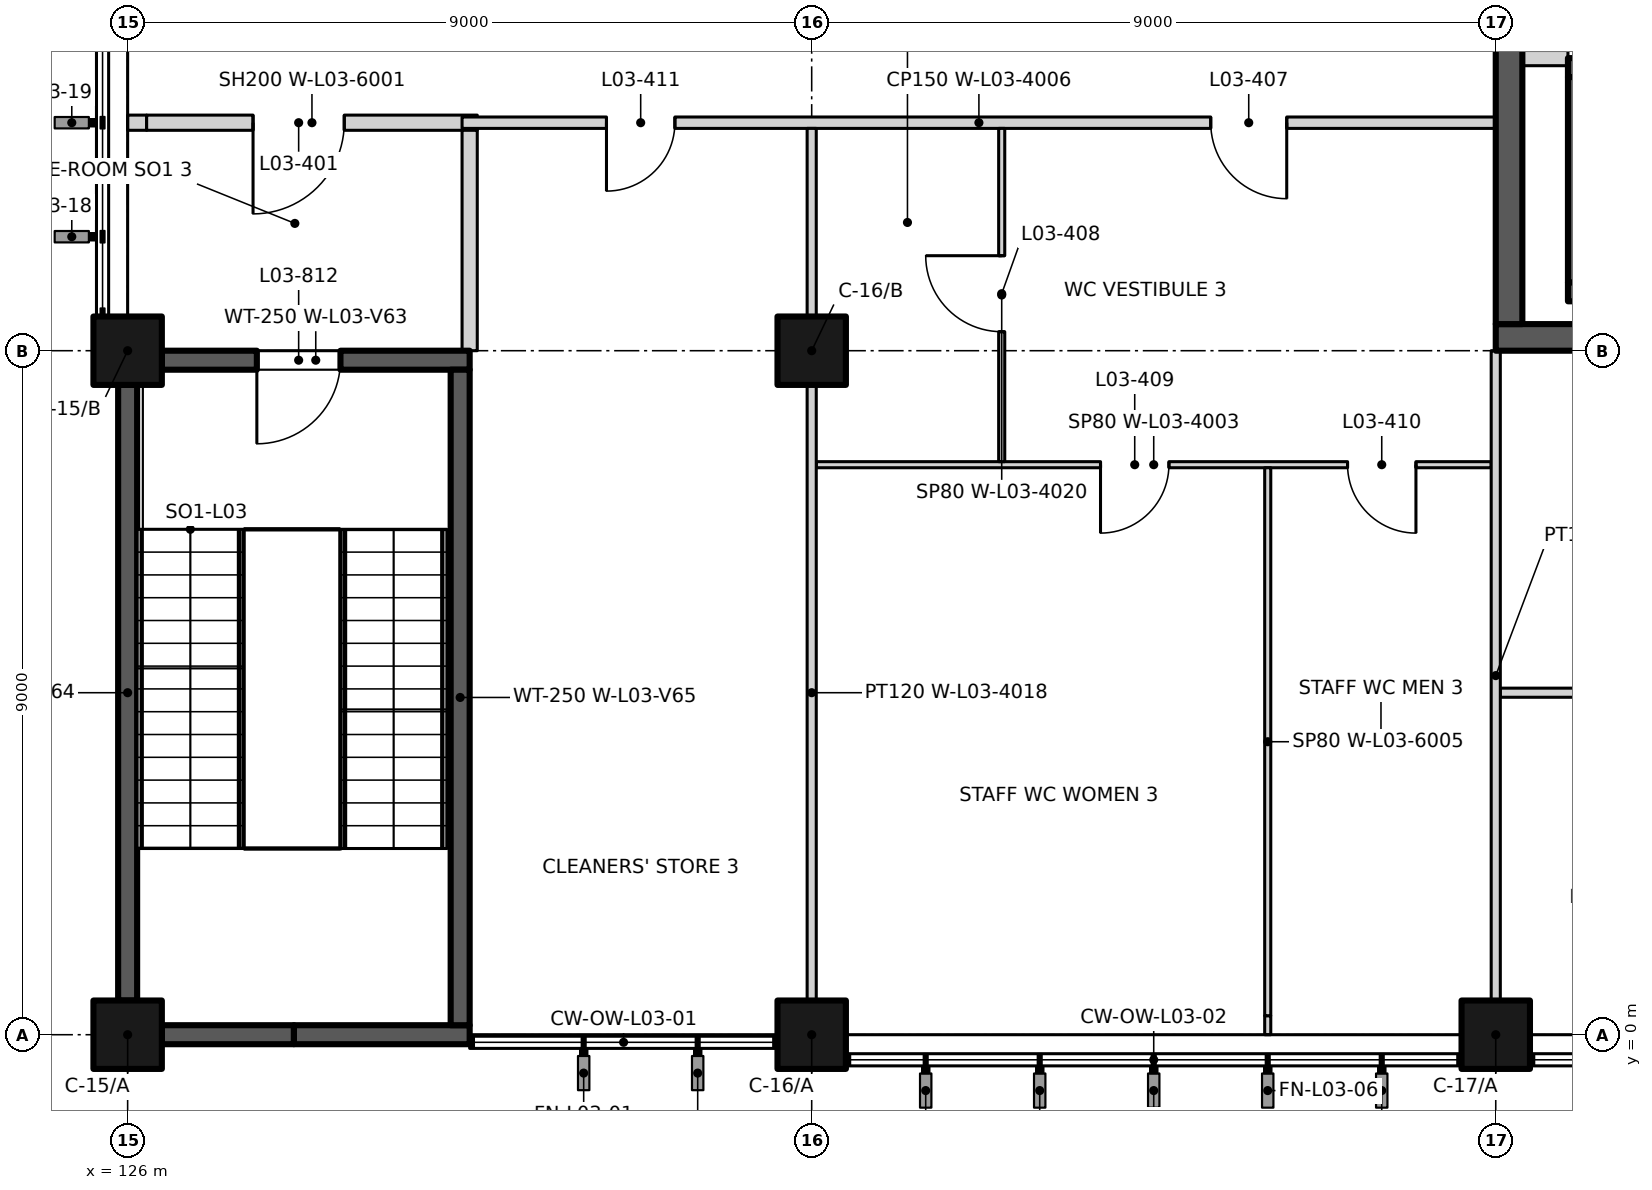
"""IFC4 building model, lengths in metres.
Left out: names, types, materials, properties, quantities, classifications, styles, units other than length and angle.
Written with IfcOpenShell. Run it as: python <this file> out.ifc"""

import sys

from ifc_helpers import new_model, si_unit, direction, frame, frame_2d, origin, origin_2d, place, context, subcontext, project, spatial, rectangle, extrude, element, fill, save


model = new_model("IFC4")
c1 = context("Model", 3, precision=1e-05, world=origin(), true_north=direction((0.0, 1.0)))
c2 = subcontext(c1, "Body", "Model", "MODEL_VIEW")
j1 = project(units=[si_unit("LENGTHUNIT", "METRE"), si_unit("PLANEANGLEUNIT", "RADIAN")], contexts=[c1])
p1 = place(None, origin())
s1 = spatial("IfcSite", under=j1, at=p1, CompositionType="ELEMENT")
p2 = place(p1, origin())
s2 = spatial("IfcBuilding", under=s1, at=p2, CompositionType="ELEMENT")
p3 = place(p2, frame((0.0, 0.0, 15.0)))
s3 = spatial("IfcBuildingStorey", under=s2, at=p3, CompositionType="ELEMENT", Elevation=15.0)
for number, where, z_axis, x_axis in (
    (1, (126.0, 0.0, 0.0), (0.0, 0.0, 1.0), (1.0, 0.0, 0.0)),
    (2, (135.0, 0.0, 0.0), (0.0, 0.0, 1.0), (1.0, 0.0, 0.0)),
    (3, (144.0, 0.0, 0.0), (0.0, 0.0, 1.0), (1.0, 0.0, 0.0)),
    (4, (126.0, 9.0, 0.0), (0.0, 0.0, 1.0), (1.0, 0.0, 0.0)),
    (5, (135.0, 9.0, 0.0), (0.0, 0.0, 1.0), (1.0, 0.0, 0.0)),
):
    element("IfcColumn", number, at=place(p3, frame(where, z_axis=z_axis, x_axis=x_axis)), inside=s3, PredefinedType="COLUMN", context=c2, shape_type="SweptSolid", body=[
        extrude(rectangle(XDim=0.9, YDim=0.9, at=origin_2d()), origin(), (0.0, 0.0, 1.0), 4.5),
    ])
p4 = place(p3, frame((126.45, 0.0, 0.0), z_axis=(0.0, 0.0, 1.0), x_axis=(1.0, 0.0, 0.0)))
e6 = element("IfcWall", 6, at=p4, inside=s3, PredefinedType="SHEAR", context=c2, shape_type="SweptSolid", body=[
    extrude(rectangle(XDim=1.738, YDim=0.25, at=frame_2d((0.869, 0.0))), origin(), (0.0, 0.0, 1.0), 4.5),
])
p5 = place(p3, frame((128.188, 0.0, 0.0), z_axis=(0.0, 0.0, 1.0), x_axis=(1.0, 0.0, 0.0)))
e7 = element("IfcWall", 7, at=p5, inside=s3, PredefinedType="SHEAR", context=c2, shape_type="SweptSolid", body=[
    extrude(rectangle(XDim=2.312, YDim=0.25, at=frame_2d((1.156, 0.0))), origin(), (0.0, 0.0, 1.0), 4.5),
])
p6 = place(p3, frame((126.45, 8.875, 0.0), z_axis=(0.0, 0.0, 1.0), x_axis=(1.0, 0.0, 0.0)))
e8 = element("IfcWall", 8, at=p6, inside=s3, PredefinedType="SHEAR", context=c2, shape_type="SweptSolid", body=[
    extrude(rectangle(XDim=4.05, YDim=0.25, at=frame_2d((2.025, 0.0))), origin(), (0.0, 0.0, 1.0), 4.5),
])
p7 = place(p6, frame((2.35, 0.0, 0.0), z_axis=(0.0, 0.0, 1.0), x_axis=(-1.0, 0.0, 0.0)))
e9 = element("IfcOpeningElement", 9, at=p7, cuts=e8, PredefinedType="OPENING", context=c2, shape_type="SweptSolid", body=[
    extrude(rectangle(XDim=1.1, YDim=2.1, at=frame_2d((0.55, 1.05))), frame((0.0, 0.135, 0.0), z_axis=(0.0, -1.0, 0.0), x_axis=(1.0, 0.0, 0.0)), (0.0, 0.0, 1.0), 0.27),
])
p8 = place(p3, frame((126.0, 0.45, 0.0), z_axis=(0.0, 0.0, 1.0), x_axis=(0.0, 1.0, 0.0)))
e10 = element("IfcWall", 10, at=p8, inside=s3, PredefinedType="SHEAR", context=c2, shape_type="SweptSolid", body=[
    extrude(rectangle(XDim=8.1, YDim=0.25, at=frame_2d((4.05, 0.0))), origin(), (0.0, 0.0, 1.0), 4.5),
])
p9 = place(p3, frame((130.375, 0.125, 0.0), z_axis=(0.0, 0.0, 1.0), x_axis=(0.0, 1.0, 0.0)))
e11 = element("IfcWall", 11, at=p9, inside=s3, PredefinedType="SHEAR", context=c2, shape_type="SweptSolid", body=[
    extrude(rectangle(XDim=8.625, YDim=0.25, at=frame_2d((4.312, 0.0))), origin(), (0.0, 0.0, 1.0), 4.5),
])
p10 = place(p3, frame((144.95, 12.725, 0.0), z_axis=(0.0, 0.0, 1.0), x_axis=(1.0, 0.0, 0.0)))
e12 = element("IfcWall", 12, at=p10, inside=s3, PredefinedType="SHEAR", context=c2, shape_type="SweptSolid", body=[
    extrude(rectangle(XDim=12.05, YDim=0.25, at=frame_2d((6.025, 0.0))), origin(), (0.0, 0.0, 1.0), 4.5),
])
p11 = place(p10, frame((1.05, 0.0, 0.0)))
e13 = element("IfcOpeningElement", 13, at=p11, cuts=e12, PredefinedType="OPENING", context=c2, shape_type="SweptSolid", body=[
    extrude(rectangle(XDim=1.1, YDim=2.1, at=frame_2d((0.55, 1.05))), frame((0.0, 0.135, 0.0), z_axis=(0.0, -1.0, 0.0), x_axis=(1.0, 0.0, 0.0)), (0.0, 0.0, 1.0), 0.27),
])
p12 = place(p10, frame((4.0, 0.0, 0.0)))
e14 = element("IfcOpeningElement", 14, at=p12, cuts=e12, PredefinedType="OPENING", context=c2, shape_type="SweptSolid", body=[
    extrude(rectangle(XDim=1.1, YDim=2.1, at=frame_2d((0.55, 1.05))), frame((0.0, 0.135, 0.0), z_axis=(0.0, -1.0, 0.0), x_axis=(1.0, 0.0, 0.0)), (0.0, 0.0, 1.0), 0.27),
])
p13 = place(p10, frame((6.95, 0.0, 0.0)))
e15 = element("IfcOpeningElement", 15, at=p13, cuts=e12, PredefinedType="OPENING", context=c2, shape_type="SweptSolid", body=[
    extrude(rectangle(XDim=1.1, YDim=2.1, at=frame_2d((0.55, 1.05))), frame((0.0, 0.135, 0.0), z_axis=(0.0, -1.0, 0.0), x_axis=(1.0, 0.0, 0.0)), (0.0, 0.0, 1.0), 0.27),
])
p14 = place(p10, frame((9.9, 0.0, 0.0)))
e16 = element("IfcOpeningElement", 16, at=p14, cuts=e12, PredefinedType="OPENING", context=c2, shape_type="SweptSolid", body=[
    extrude(rectangle(XDim=1.1, YDim=2.1, at=frame_2d((0.55, 1.05))), frame((0.0, 0.135, 0.0), z_axis=(0.0, -1.0, 0.0), x_axis=(1.0, 0.0, 0.0)), (0.0, 0.0, 1.0), 0.27),
])
p15 = place(p3, frame((144.95, 9.775, 0.0), z_axis=(0.0, 0.0, 1.0), x_axis=(1.0, 0.0, 0.0)))
e17 = element("IfcWall", 17, at=p15, inside=s3, PredefinedType="SHEAR", context=c2, shape_type="SweptSolid", body=[
    extrude(rectangle(XDim=12.05, YDim=0.25, at=frame_2d((6.025, 0.0))), origin(), (0.0, 0.0, 1.0), 4.5),
])
p16 = place(p3, frame((145.075, 9.9, 0.0), z_axis=(0.0, 0.0, 1.0), x_axis=(0.0, 1.0, 0.0)))
e18 = element("IfcWall", 18, at=p16, inside=s3, PredefinedType="SHEAR", context=c2, shape_type="SweptSolid", body=[
    extrude(rectangle(XDim=2.7, YDim=0.25, at=frame_2d((1.35, 0.0))), origin(), (0.0, 0.0, 1.0), 4.5),
])
p17 = place(p3, frame((144.06, 4.5, 0.0), z_axis=(0.0, 0.0, 1.0), x_axis=(1.0, 0.0, 0.0)))
e19 = element("IfcWall", 19, at=p17, inside=s3, PredefinedType="PARTITIONING", context=c2, shape_type="SweptSolid", body=[
    extrude(rectangle(XDim=6.0, YDim=0.12, at=frame_2d((3.0, 0.0))), origin(), (0.0, 0.0, 1.0), 4.2),
])
p18 = place(p17, frame((3.39, 0.0, 0.0), z_axis=(0.0, 0.0, 1.0), x_axis=(-1.0, 0.0, 0.0)))
e20 = element("IfcOpeningElement", 20, at=p18, cuts=e19, PredefinedType="OPENING", context=c2, shape_type="SweptSolid", body=[
    extrude(rectangle(XDim=0.9, YDim=2.1, at=frame_2d((0.45, 1.05))), frame((0.0, 0.07, 0.0), z_axis=(0.0, -1.0, 0.0), x_axis=(1.0, 0.0, 0.0)), (0.0, 0.0, 1.0), 0.14),
])
p19 = place(p3, frame((135.06, 7.5, 0.0), z_axis=(0.0, 0.0, 1.0), x_axis=(1.0, 0.0, 0.0)))
e21 = element("IfcWall", 21, at=p19, inside=s3, PredefinedType="PARTITIONING", context=c2, shape_type="SweptSolid", body=[
    extrude(rectangle(XDim=8.88, YDim=0.08, at=frame_2d((4.44, 0.0))), origin(), (0.0, 0.0, 1.0), 4.2),
])
p20 = place(p19, frame((4.64, 0.0, 0.0), z_axis=(0.0, 0.0, 1.0), x_axis=(-1.0, 0.0, 0.0)))
e22 = element("IfcOpeningElement", 22, at=p20, cuts=e21, PredefinedType="OPENING", context=c2, shape_type="SweptSolid", body=[
    extrude(rectangle(XDim=0.9, YDim=2.1, at=frame_2d((0.45, 1.05))), frame((0.0, 0.05, 0.0), z_axis=(0.0, -1.0, 0.0), x_axis=(1.0, 0.0, 0.0)), (0.0, 0.0, 1.0), 0.1),
])
p21 = place(p19, frame((7.89, 0.0, 0.0), z_axis=(0.0, 0.0, 1.0), x_axis=(-1.0, 0.0, 0.0)))
e23 = element("IfcOpeningElement", 23, at=p21, cuts=e21, PredefinedType="OPENING", context=c2, shape_type="SweptSolid", body=[
    extrude(rectangle(XDim=0.9, YDim=2.1, at=frame_2d((0.45, 1.05))), frame((0.0, 0.05, 0.0), z_axis=(0.0, -1.0, 0.0), x_axis=(1.0, 0.0, 0.0)), (0.0, 0.0, 1.0), 0.1),
])
p22 = place(p3, frame((144.0, 9.175, 0.0), z_axis=(0.0, 0.0, 1.0), x_axis=(1.0, 0.0, 0.0)))
e24 = element("IfcWall", 24, at=p22, inside=s3, PredefinedType="SHEAR", context=c2, shape_type="SweptSolid", body=[
    extrude(rectangle(XDim=18.0, YDim=0.35, at=frame_2d((9.0, 0.0))), origin(), (0.0, 0.0, 1.0), 4.2),
])
p23 = place(p22, frame((16.463, 0.0, 0.0), z_axis=(0.0, 0.0, 1.0), x_axis=(-1.0, 0.0, 0.0)))
e25 = element("IfcOpeningElement", 25, at=p23, cuts=e24, PredefinedType="OPENING", context=c2, shape_type="SweptSolid", body=[
    extrude(rectangle(XDim=2.1, YDim=2.4, at=frame_2d((1.05, 1.2))), frame((0.0, 0.185, 0.0), z_axis=(0.0, -1.0, 0.0), x_axis=(1.0, 0.0, 0.0)), (0.0, 0.0, 1.0), 0.37),
])
p24 = place(p3, frame((126.0, 12.0, 0.0), z_axis=(0.0, 0.0, 1.0), x_axis=(1.0, 0.0, 0.0)))
e26 = element("IfcWall", 26, at=p24, inside=s3, PredefinedType="PARTITIONING", context=c2, shape_type="SweptSolid", body=[
    extrude(rectangle(XDim=0.25, YDim=0.2, at=frame_2d((0.125, 0.0))), origin(), (0.0, 0.0, 1.0), 3.6),
])
p25 = place(p3, frame((126.25, 12.0, 0.0), z_axis=(0.0, 0.0, 1.0), x_axis=(1.0, 0.0, 0.0)))
e27 = element("IfcWall", 27, at=p25, inside=s3, PredefinedType="PARTITIONING", context=c2, shape_type="SweptSolid", body=[
    extrude(rectangle(XDim=4.35, YDim=0.2, at=frame_2d((2.175, 0.0))), origin(), (0.0, 0.0, 1.0), 4.2),
])
p26 = place(p25, frame((2.6, 0.0, 0.0), z_axis=(0.0, 0.0, 1.0), x_axis=(-1.0, 0.0, 0.0)))
e28 = element("IfcOpeningElement", 28, at=p26, cuts=e27, PredefinedType="OPENING", context=c2, shape_type="SweptSolid", body=[
    extrude(rectangle(XDim=1.2, YDim=2.1, at=frame_2d((0.6, 1.05))), frame((0.0, 0.11, 0.0), z_axis=(0.0, -1.0, 0.0), x_axis=(1.0, 0.0, 0.0)), (0.0, 0.0, 1.0), 0.22),
])
p27 = place(p3, frame((130.4, 12.0, 0.0), z_axis=(0.0, 0.0, 1.0), x_axis=(1.0, 0.0, 0.0)))
e29 = element("IfcWall", 29, at=p27, inside=s3, PredefinedType="PARTITIONING", context=c2, shape_type="SweptSolid", body=[
    extrude(rectangle(XDim=13.6, YDim=0.15, at=frame_2d((6.8, 0.0))), origin(), (0.0, 0.0, 1.0), 4.2),
])
p28 = place(p27, frame((10.85, 0.0, 0.0), z_axis=(0.0, 0.0, 1.0), x_axis=(-1.0, 0.0, 0.0)))
e30 = element("IfcOpeningElement", 30, at=p28, cuts=e29, PredefinedType="OPENING", context=c2, shape_type="SweptSolid", body=[
    extrude(rectangle(XDim=1.0, YDim=2.1, at=frame_2d((0.5, 1.05))), frame((0.0, 0.085, 0.0), z_axis=(0.0, -1.0, 0.0), x_axis=(1.0, 0.0, 0.0)), (0.0, 0.0, 1.0), 0.17),
])
p29 = place(p27, frame((2.8, 0.0, 0.0), z_axis=(0.0, 0.0, 1.0), x_axis=(-1.0, 0.0, 0.0)))
e31 = element("IfcOpeningElement", 31, at=p29, cuts=e29, PredefinedType="OPENING", context=c2, shape_type="SweptSolid", body=[
    extrude(rectangle(XDim=0.9, YDim=2.1, at=frame_2d((0.45, 1.05))), frame((0.0, 0.085, 0.0), z_axis=(0.0, -1.0, 0.0), x_axis=(1.0, 0.0, 0.0)), (0.0, 0.0, 1.0), 0.17),
])
p30 = place(p3, frame((144.35, 12.85, 0.0), z_axis=(0.0, 0.0, 1.0), x_axis=(1.0, 0.0, 0.0)))
e32 = element("IfcWall", 32, at=p30, inside=s3, PredefinedType="PARTITIONING", context=c2, shape_type="SweptSolid", body=[
    extrude(rectangle(XDim=0.6, YDim=0.2, at=frame_2d((0.3, 0.0))), origin(), (0.0, 0.0, 1.0), 4.2),
])
p31 = place(p3, frame((130.5, 9.0, 0.0), z_axis=(0.0, 0.0, 1.0), x_axis=(0.0, 1.0, 0.0)))
e33 = element("IfcWall", 33, at=p31, inside=s3, PredefinedType="PARTITIONING", context=c2, shape_type="SweptSolid", body=[
    extrude(rectangle(XDim=2.9, YDim=0.2, at=frame_2d((1.45, 0.0))), origin(), (0.0, 0.0, 1.0), 4.2),
])
p32 = place(p3, frame((135.0, 0.45, 0.0), z_axis=(0.0, 0.0, 1.0), x_axis=(0.0, 1.0, 0.0)))
e34 = element("IfcWall", 34, at=p32, inside=s3, PredefinedType="PARTITIONING", context=c2, shape_type="SweptSolid", body=[
    extrude(rectangle(XDim=8.1, YDim=0.12, at=frame_2d((4.05, 0.0))), origin(), (0.0, 0.0, 1.0), 4.2),
])
p33 = place(p3, frame((135.0, 9.45, 0.0), z_axis=(0.0, 0.0, 1.0), x_axis=(0.0, 1.0, 0.0)))
e35 = element("IfcWall", 35, at=p33, inside=s3, PredefinedType="PARTITIONING", context=c2, shape_type="SweptSolid", body=[
    extrude(rectangle(XDim=2.475, YDim=0.12, at=frame_2d((1.238, 0.0))), origin(), (0.0, 0.0, 1.0), 4.2),
])
p34 = place(p3, frame((137.5, 7.54, 0.0), z_axis=(0.0, 0.0, 1.0), x_axis=(0.0, 1.0, 0.0)))
e36 = element("IfcWall", 36, at=p34, inside=s3, PredefinedType="PARTITIONING", context=c2, shape_type="SweptSolid", body=[
    extrude(rectangle(XDim=4.385, YDim=0.08, at=frame_2d((2.192, 0.0))), origin(), (0.0, 0.0, 1.0), 4.2),
])
p35 = place(p34, frame((1.71, 0.0, 0.0)))
e37 = element("IfcOpeningElement", 37, at=p35, cuts=e36, PredefinedType="OPENING", context=c2, shape_type="SweptSolid", body=[
    extrude(rectangle(XDim=1.0, YDim=2.1, at=frame_2d((0.5, 1.05))), frame((0.0, 0.05, 0.0), z_axis=(0.0, -1.0, 0.0), x_axis=(1.0, 0.0, 0.0)), (0.0, 0.0, 1.0), 0.1),
])
p36 = place(p3, frame((141.0, 0.0, 0.0), z_axis=(0.0, 0.0, 1.0), x_axis=(0.0, 1.0, 0.0)))
e38 = element("IfcWall", 38, at=p36, inside=s3, PredefinedType="PARTITIONING", context=c2, shape_type="SweptSolid", body=[
    extrude(rectangle(XDim=0.25, YDim=0.08, at=frame_2d((0.125, 0.0))), origin(), (0.0, 0.0, 1.0), 3.6),
])
p37 = place(p3, frame((141.0, 0.25, 0.0), z_axis=(0.0, 0.0, 1.0), x_axis=(0.0, 1.0, 0.0)))
e39 = element("IfcWall", 39, at=p37, inside=s3, PredefinedType="PARTITIONING", context=c2, shape_type="SweptSolid", body=[
    extrude(rectangle(XDim=7.21, YDim=0.08, at=frame_2d((3.605, 0.0))), origin(), (0.0, 0.0, 1.0), 4.2),
])
p38 = place(p3, frame((144.0, 0.45, 0.0), z_axis=(0.0, 0.0, 1.0), x_axis=(0.0, 1.0, 0.0)))
e40 = element("IfcWall", 40, at=p38, inside=s3, PredefinedType="PARTITIONING", context=c2, shape_type="SweptSolid", body=[
    extrude(rectangle(XDim=8.55, YDim=0.12, at=frame_2d((4.275, 0.0))), origin(), (0.0, 0.0, 1.0), 4.2),
])
p39 = place(p3, frame((144.175, 9.35, 0.0), z_axis=(0.0, 0.0, 1.0), x_axis=(0.0, 1.0, 0.0)))
e41 = element("IfcWall", 41, at=p39, inside=s3, PredefinedType="SHEAR", context=c2, shape_type="SweptSolid", body=[
    extrude(rectangle(XDim=17.4, YDim=0.35, at=frame_2d((8.7, 0.0))), origin(), (0.0, 0.0, 1.0), 4.2),
])
p40 = place(p39, frame((3.75, 0.0, 0.0)))
e42 = element("IfcOpeningElement", 42, at=p40, cuts=e41, PredefinedType="OPENING", context=c2, shape_type="SweptSolid", body=[
    extrude(rectangle(XDim=1.6, YDim=2.4, at=frame_2d((0.8, 1.2))), frame((0.0, 0.185, 0.0), z_axis=(0.0, -1.0, 0.0), x_axis=(1.0, 0.0, 0.0)), (0.0, 0.0, 1.0), 0.37),
])
p41 = place(p7, origin())
e43 = element("IfcDoor", 43, at=p41, inside=s3, OperationType="SINGLE_SWING_RIGHT", PredefinedType="DOOR", context=c2, shape_type="SweptSolid", body=[
    extrude(rectangle(XDim=1.1, YDim=2.1, at=frame_2d((0.55, 1.05))), frame((0.0, 0.025, 0.0), z_axis=(0.0, -1.0, 0.0), x_axis=(1.0, 0.0, 0.0)), (0.0, 0.0, 1.0), 0.05),
])
fill(e9, e43)
p42 = place(p26, origin())
e44 = element("IfcDoor", 44, at=p42, inside=s3, OperationType="SINGLE_SWING_RIGHT", PredefinedType="DOOR", context=c2, shape_type="SweptSolid", body=[
    extrude(rectangle(XDim=1.2, YDim=2.1, at=frame_2d((0.6, 1.05))), frame((0.0, 0.025, 0.0), z_axis=(0.0, -1.0, 0.0), x_axis=(1.0, 0.0, 0.0)), (0.0, 0.0, 1.0), 0.05),
])
fill(e28, e44)
p43 = place(p28, origin())
e45 = element("IfcDoor", 45, at=p43, inside=s3, OperationType="SINGLE_SWING_LEFT", PredefinedType="DOOR", context=c2, shape_type="SweptSolid", body=[
    extrude(rectangle(XDim=1.0, YDim=2.1, at=frame_2d((0.5, 1.05))), frame((0.0, 0.025, 0.0), z_axis=(0.0, -1.0, 0.0), x_axis=(1.0, 0.0, 0.0)), (0.0, 0.0, 1.0), 0.05),
])
fill(e30, e45)
p44 = place(p35, origin())
e46 = element("IfcDoor", 46, at=p44, inside=s3, OperationType="SINGLE_SWING_RIGHT", PredefinedType="DOOR", context=c2, shape_type="SweptSolid", body=[
    extrude(rectangle(XDim=1.0, YDim=2.1, at=frame_2d((0.5, 1.05))), frame((0.0, 0.025, 0.0), z_axis=(0.0, -1.0, 0.0), x_axis=(1.0, 0.0, 0.0)), (0.0, 0.0, 1.0), 0.05),
])
fill(e37, e46)
p45 = place(p20, origin())
e47 = element("IfcDoor", 47, at=p45, inside=s3, OperationType="SINGLE_SWING_RIGHT", PredefinedType="DOOR", context=c2, shape_type="SweptSolid", body=[
    extrude(rectangle(XDim=0.9, YDim=2.1, at=frame_2d((0.45, 1.05))), frame((0.0, 0.025, 0.0), z_axis=(0.0, -1.0, 0.0), x_axis=(1.0, 0.0, 0.0)), (0.0, 0.0, 1.0), 0.05),
])
fill(e22, e47)
p46 = place(p21, origin())
e48 = element("IfcDoor", 48, at=p46, inside=s3, OperationType="SINGLE_SWING_LEFT", PredefinedType="DOOR", context=c2, shape_type="SweptSolid", body=[
    extrude(rectangle(XDim=0.9, YDim=2.1, at=frame_2d((0.45, 1.05))), frame((0.0, 0.025, 0.0), z_axis=(0.0, -1.0, 0.0), x_axis=(1.0, 0.0, 0.0)), (0.0, 0.0, 1.0), 0.05),
])
fill(e23, e48)
p47 = place(p29, origin())
e49 = element("IfcDoor", 49, at=p47, inside=s3, OperationType="SINGLE_SWING_RIGHT", PredefinedType="DOOR", context=c2, shape_type="SweptSolid", body=[
    extrude(rectangle(XDim=0.9, YDim=2.1, at=frame_2d((0.45, 1.05))), frame((0.0, 0.025, 0.0), z_axis=(0.0, -1.0, 0.0), x_axis=(1.0, 0.0, 0.0)), (0.0, 0.0, 1.0), 0.05),
])
fill(e31, e49)
save(model, sys.argv[1])
